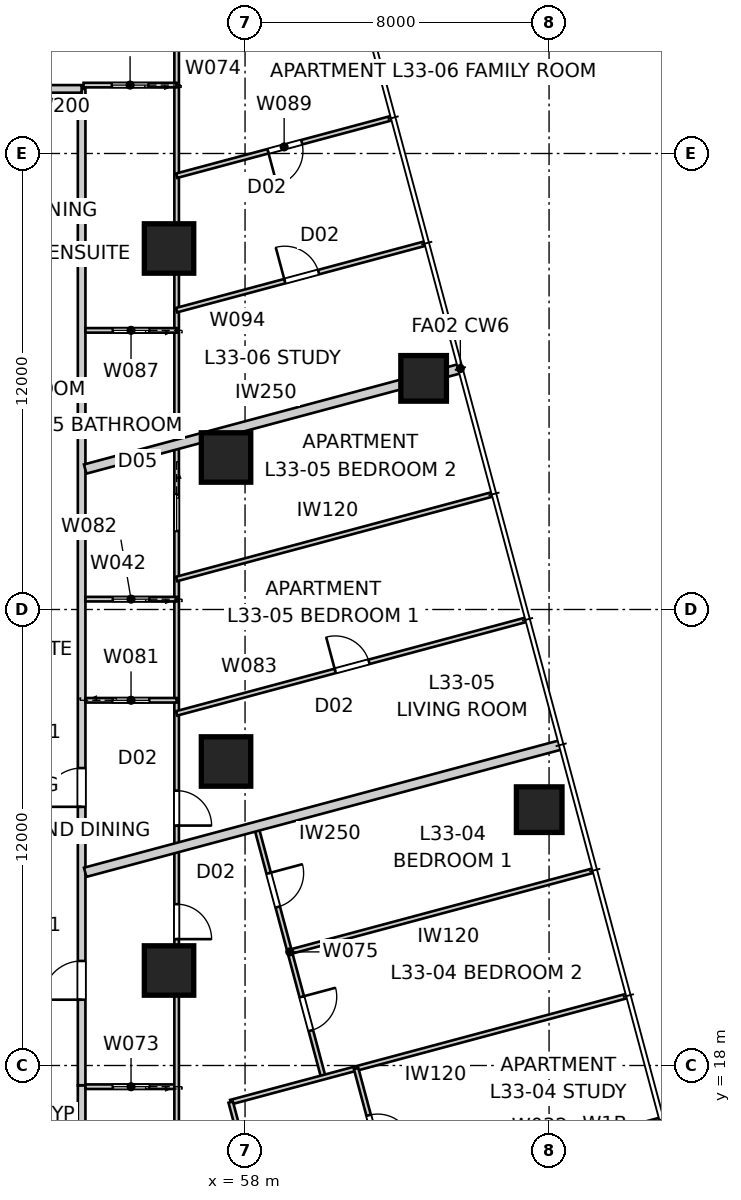
"""IFC4 building model, lengths in metres.
Left out: names, types, materials, properties, quantities, classifications, styles, units other than length and angle.
Written with IfcOpenShell. Run it as: python <this file> out.ifc"""

import sys

from ifc_helpers import new_model, si_unit, direction, frame, frame_2d, origin, origin_2d, place, context, subcontext, project, spatial, rectangle, extrude, element, fill, save


model = new_model("IFC4")
c1 = context("Model", 3, precision=1e-05, world=origin(), true_north=direction((0.0, 1.0)))
c2 = subcontext(c1, "Body", "Model", "MODEL_VIEW")
j1 = project(units=[si_unit("LENGTHUNIT", "METRE"), si_unit("PLANEANGLEUNIT", "RADIAN")], contexts=[c1])
p1 = place(None, origin())
s1 = spatial("IfcSite", under=j1, at=p1, CompositionType="ELEMENT")
p2 = place(p1, origin())
s2 = spatial("IfcBuilding", under=s1, at=p2, CompositionType="ELEMENT")
p3 = place(p2, frame((0.0, 0.0, 121.8)))
s3 = spatial("IfcBuildingStorey", under=s2, at=p3, CompositionType="ELEMENT", Elevation=121.8)
for number, where, z_axis, x_axis in (
    (1, (65.74, 24.733, 0.0), (0.0, 0.0, 1.0), (1.0, 0.0, 0.0)),
    (2, (62.699, 36.082, 0.0), (0.0, 0.0, 1.0), (1.0, 0.0, 0.0)),
):
    element("IfcColumn", number, at=place(p3, frame(where, z_axis=z_axis, x_axis=x_axis)), inside=s3, PredefinedType="COLUMN", context=c2, shape_type="SweptSolid", body=[
        extrude(rectangle(XDim=1.2, YDim=1.2, at=origin_2d()), origin(), (0.0, 0.0, 1.0), 3.4),
    ])
for number, where, z_axis, x_axis in (
    (3, (57.5, 26.0, 0.0), (0.0, 0.0, 1.0), (1.0, 0.0, 0.0)),
    (4, (57.5, 34.0, 0.0), (0.0, 0.0, 1.0), (1.0, 0.0, 0.0)),
    (5, (56.0, 39.5, 0.0), (0.0, 0.0, 1.0), (1.0, 0.0, 0.0)),
    (6, (56.0, 20.5, 0.0), (0.0, 0.0, 1.0), (1.0, 0.0, 0.0)),
):
    element("IfcColumn", number, at=place(p3, frame(where, z_axis=z_axis, x_axis=x_axis)), inside=s3, PredefinedType="COLUMN", context=c2, shape_type="SweptSolid", body=[
        extrude(rectangle(XDim=1.3, YDim=1.3, at=origin_2d()), origin(), (0.0, 0.0, 1.0), 3.4),
    ])
p4 = place(p3, frame((65.107, 15.504, 0.0), z_axis=(0.0, 0.0, 1.0), x_axis=(0.965934430412, 0.258786931944, 0.0)))
e7 = element("IfcWall", 7, at=p4, inside=s3, PredefinedType="SOLIDWALL", context=c2, shape_type="SweptSolid", body=[
    extrude(rectangle(XDim=4.0, YDim=0.2, at=frame_2d((2.0, 0.0))), origin(), (0.0, 0.0, 1.0), 3.25),
])
p5 = place(p4, frame((1.0, 0.0, 0.45)))
e8 = element("IfcOpeningElement", 8, at=p5, cuts=e7, PredefinedType="OPENING", context=c2, shape_type="SweptSolid", body=[
    extrude(rectangle(XDim=2.0, YDim=1.8, at=frame_2d((1.0, 0.9))), frame((0.0, 0.11, 0.0), z_axis=(0.0, -1.0, 0.0), x_axis=(1.0, 0.0, 0.0)), (0.0, 0.0, 1.0), 0.22),
])
p6 = place(p3, frame((53.7, 15.926, 0.0), z_axis=(0.0, 0.0, 1.0), x_axis=(0.0, 1.0, 0.0)))
e9 = element("IfcWall", 9, at=p6, inside=s3, PredefinedType="PARTITIONING", context=c2, shape_type="SweptSolid", body=[
    extrude(rectangle(XDim=1.554, YDim=0.2, at=frame_2d((0.777, 0.0))), origin(), (0.0, 0.0, 1.0), 2.722),
])
p7 = place(p3, frame((53.7, 17.48, 0.0), z_axis=(0.0, 0.0, 1.0), x_axis=(0.0, 1.0, 0.0)))
e10 = element("IfcWall", 10, at=p7, inside=s3, PredefinedType="PARTITIONING", context=c2, shape_type="SweptSolid", body=[
    extrude(rectangle(XDim=26.22, YDim=0.2, at=frame_2d((13.11, 0.0))), origin(), (0.0, 0.0, 1.0), 3.25),
])
p8 = place(p7, frame((2.252, 0.0, 0.0)))
e11 = element("IfcOpeningElement", 11, at=p8, cuts=e10, PredefinedType="OPENING", context=c2, shape_type="SweptSolid", body=[
    extrude(rectangle(XDim=1.02, YDim=2.34, at=frame_2d((0.51, 1.17))), frame((0.0, 0.11, 0.0), z_axis=(0.0, -1.0, 0.0), x_axis=(1.0, 0.0, 0.0)), (0.0, 0.0, 1.0), 0.22),
])
p9 = place(p7, frame((7.328, 0.0, 0.0)))
e12 = element("IfcOpeningElement", 12, at=p9, cuts=e10, PredefinedType="OPENING", context=c2, shape_type="SweptSolid", body=[
    extrude(rectangle(XDim=1.02, YDim=2.34, at=frame_2d((0.51, 1.17))), frame((0.0, 0.11, 0.0), z_axis=(0.0, -1.0, 0.0), x_axis=(1.0, 0.0, 0.0)), (0.0, 0.0, 1.0), 0.22),
])
p10 = place(p3, frame((53.7, 43.7, 0.0), z_axis=(0.0, 0.0, 1.0), x_axis=(-1.0, 0.0, 0.0)))
e13 = element("IfcWall", 13, at=p10, inside=s3, PredefinedType="PARTITIONING", context=c2, shape_type="SweptSolid", body=[
    extrude(rectangle(XDim=1.18, YDim=0.2, at=frame_2d((0.59, 0.0))), origin(), (0.0, 0.0, 1.0), 2.722),
])
p11 = place(p3, frame((63.665, 36.341, 0.0), z_axis=(0.0, 0.0, 1.0), x_axis=(-0.965927365002, -0.258813302479, 0.0)))
e14 = element("IfcWall", 14, at=p11, inside=s3, PredefinedType="PARTITIONING", context=c2, shape_type="SweptSolid", body=[
    extrude(rectangle(XDim=10.22, YDim=0.25, at=frame_2d((5.11, 0.0))), origin(), (0.0, 0.0, 1.0), 3.25),
])
p12 = place(p3, frame((66.318, 26.44, 0.0), z_axis=(0.0, 0.0, 1.0), x_axis=(-0.965924854576, -0.258822671559, 0.0)))
e15 = element("IfcWall", 15, at=p12, inside=s3, PredefinedType="PARTITIONING", context=c2, shape_type="SweptSolid", body=[
    extrude(rectangle(XDim=12.966, YDim=0.25, at=frame_2d((6.483, 0.0))), origin(), (0.0, 0.0, 1.0), 3.25),
])
p13 = place(p3, frame((56.2, 17.442, 0.0), z_axis=(0.0, 0.0, 1.0), x_axis=(-1.0, 0.0, 0.0)))
e16 = element("IfcWall", 16, at=p13, inside=s3, PredefinedType="PARTITIONING", context=c2, shape_type="SweptSolid", body=[
    extrude(rectangle(XDim=2.4, YDim=0.12, at=frame_2d((1.2, 0.0))), origin(), (0.0, 0.0, 1.0), 3.25),
])
p14 = place(p13, frame((0.72, 0.0, 0.0)))
e17 = element("IfcOpeningElement", 17, at=p14, cuts=e16, PredefinedType="OPENING", context=c2, shape_type="SweptSolid", body=[
    extrude(rectangle(XDim=0.96, YDim=2.1, at=frame_2d((0.48, 1.05))), frame((0.0, 0.07, 0.0), z_axis=(0.0, -1.0, 0.0), x_axis=(1.0, 0.0, 0.0)), (0.0, 0.0, 1.0), 0.14),
])
p15 = place(p3, frame((56.2, 46.2, 0.0), z_axis=(0.0, 0.0, 1.0), x_axis=(0.0, -1.0, 0.0)))
e18 = element("IfcWall", 18, at=p15, inside=s3, PredefinedType="PARTITIONING", context=c2, shape_type="SweptSolid", body=[
    extrude(rectangle(XDim=33.2, YDim=0.12, at=frame_2d((16.6, 0.0))), origin(), (0.0, 0.0, 1.0), 2.55),
])
p16 = place(p15, frame((23.955, 0.0, 0.0)))
e19 = element("IfcOpeningElement", 19, at=p16, cuts=e18, PredefinedType="OPENING", context=c2, shape_type="SweptSolid", body=[
    extrude(rectangle(XDim=0.92, YDim=2.34, at=frame_2d((0.46, 1.17))), frame((0.0, 0.07, 0.0), z_axis=(0.0, -1.0, 0.0), x_axis=(1.0, 0.0, 0.0)), (0.0, 0.0, 1.0), 0.14),
])
p17 = place(p15, frame((20.966, 0.0, 0.0)))
e20 = element("IfcOpeningElement", 20, at=p17, cuts=e18, PredefinedType="OPENING", context=c2, shape_type="SweptSolid", body=[
    extrude(rectangle(XDim=0.92, YDim=2.34, at=frame_2d((0.46, 1.17))), frame((0.0, 0.07, 0.0), z_axis=(0.0, -1.0, 0.0), x_axis=(1.0, 0.0, 0.0)), (0.0, 0.0, 1.0), 0.14),
])
p18 = place(p15, frame((13.174, 0.0, 0.0)))
e21 = element("IfcOpeningElement", 21, at=p18, cuts=e18, PredefinedType="OPENING", context=c2, shape_type="SweptSolid", body=[
    extrude(rectangle(XDim=0.96, YDim=2.1, at=frame_2d((0.48, 1.05))), frame((0.0, 0.07, 0.0), z_axis=(0.0, -1.0, 0.0), x_axis=(1.0, 0.0, 0.0)), (0.0, 0.0, 1.0), 0.14),
])
p19 = place(p3, frame((58.292, 24.29, 0.0), z_axis=(0.0, 0.0, 1.0), x_axis=(0.258809899302, -0.965928276853, 0.0)))
e22 = element("IfcWall", 22, at=p19, inside=s3, PredefinedType="PARTITIONING", context=c2, shape_type="SweptSolid", body=[
    extrude(rectangle(XDim=6.833, YDim=0.12, at=frame_2d((3.417, 0.0))), origin(), (0.0, 0.0, 1.0), 3.25),
])
p20 = place(p19, frame((1.273, 0.0, 0.0)))
e23 = element("IfcOpeningElement", 23, at=p20, cuts=e22, PredefinedType="OPENING", context=c2, shape_type="SweptSolid", body=[
    extrude(rectangle(XDim=0.92, YDim=2.34, at=frame_2d((0.46, 1.17))), frame((0.0, 0.07, 0.0), z_axis=(0.0, -1.0, 0.0), x_axis=(1.0, 0.0, 0.0)), (0.0, 0.0, 1.0), 0.14),
])
p21 = place(p19, frame((4.64, 0.0, 0.0)))
e24 = element("IfcOpeningElement", 24, at=p21, cuts=e22, PredefinedType="OPENING", context=c2, shape_type="SweptSolid", body=[
    extrude(rectangle(XDim=0.92, YDim=2.34, at=frame_2d((0.46, 1.17))), frame((0.0, 0.07, 0.0), z_axis=(0.0, -1.0, 0.0), x_axis=(1.0, 0.0, 0.0)), (0.0, 0.0, 1.0), 0.14),
])
p22 = place(p3, frame((68.048, 19.83, 0.0), z_axis=(0.0, 0.0, 1.0), x_axis=(-0.965921496576, -0.258835203272, 0.0)))
e25 = element("IfcWall", 25, at=p22, inside=s3, PredefinedType="PARTITIONING", context=c2, shape_type="SweptSolid", body=[
    extrude(rectangle(XDim=10.793, YDim=0.12, at=frame_2d((5.397, 0.0))), origin(), (0.0, 0.0, 1.0), 3.25),
])
p23 = place(p3, frame((57.623, 17.036, 0.0), z_axis=(0.0, 0.0, 1.0), x_axis=(0.258816044185, -0.965926630377, 0.0)))
e26 = element("IfcWall", 26, at=p23, inside=s3, PredefinedType="PARTITIONING", context=c2, shape_type="SweptSolid", body=[
    extrude(rectangle(XDim=7.377, YDim=0.12, at=frame_2d((3.688, 0.0))), origin(), (0.0, 0.0, 1.0), 2.638),
])
p24 = place(p23, frame((3.248, 0.0, 0.0)))
e27 = element("IfcOpeningElement", 27, at=p24, cuts=e26, PredefinedType="OPENING", context=c2, shape_type="SweptSolid", body=[
    extrude(rectangle(XDim=0.92, YDim=2.34, at=frame_2d((0.46, 1.17))), frame((0.0, 0.07, 0.0), z_axis=(0.0, -1.0, 0.0), x_axis=(1.0, 0.0, 0.0)), (0.0, 0.0, 1.0), 0.14),
])
p25 = place(p3, frame((67.164, 23.13, 0.0), z_axis=(0.0, 0.0, 1.0), x_axis=(-0.965929470378, -0.258805444794, 0.0)))
e28 = element("IfcWall", 28, at=p25, inside=s3, PredefinedType="PARTITIONING", context=c2, shape_type="SweptSolid", body=[
    extrude(rectangle(XDim=8.269, YDim=0.12, at=frame_2d((4.135, 0.0))), origin(), (0.0, 0.0, 1.0), 2.722),
])
p26 = place(p3, frame((60.923, 17.92, 0.0), z_axis=(0.0, 0.0, 1.0), x_axis=(0.258846923464, -0.965918355874, 0.0)))
e29 = element("IfcWall", 29, at=p26, inside=s3, PredefinedType="PARTITIONING", context=c2, shape_type="SweptSolid", body=[
    extrude(rectangle(XDim=7.377, YDim=0.12, at=frame_2d((3.688, 0.0))), origin(), (0.0, 0.0, 1.0), 3.25),
])
p27 = place(p26, frame((4.932, 0.0, 0.0)))
e30 = element("IfcOpeningElement", 30, at=p27, cuts=e29, PredefinedType="OPENING", context=c2, shape_type="SweptSolid", body=[
    extrude(rectangle(XDim=0.92, YDim=2.34, at=frame_2d((0.46, 1.17))), frame((0.0, 0.07, 0.0), z_axis=(0.0, -1.0, 0.0), x_axis=(1.0, 0.0, 0.0)), (0.0, 0.0, 1.0), 0.14),
])
p28 = place(p26, frame((1.273, 0.0, 0.0)))
e31 = element("IfcOpeningElement", 31, at=p28, cuts=e29, PredefinedType="OPENING", context=c2, shape_type="SweptSolid", body=[
    extrude(rectangle(XDim=0.92, YDim=2.34, at=frame_2d((0.46, 1.17))), frame((0.0, 0.07, 0.0), z_axis=(0.0, -1.0, 0.0), x_axis=(1.0, 0.0, 0.0)), (0.0, 0.0, 1.0), 0.14),
])
p29 = place(p3, frame((53.8, 27.611, 0.0), z_axis=(0.0, 0.0, 1.0), x_axis=(1.0, 0.0, 0.0)))
e32 = element("IfcWall", 32, at=p29, inside=s3, PredefinedType="PARTITIONING", context=c2, shape_type="SweptSolid", body=[
    extrude(rectangle(XDim=2.4, YDim=0.12, at=frame_2d((1.2, 0.0))), origin(), (0.0, 0.0, 1.0), 3.25),
])
p30 = place(p29, frame((0.72, 0.0, 0.0)))
e33 = element("IfcOpeningElement", 33, at=p30, cuts=e32, PredefinedType="OPENING", context=c2, shape_type="SweptSolid", body=[
    extrude(rectangle(XDim=0.96, YDim=2.1, at=frame_2d((0.48, 1.05))), frame((0.0, 0.07, 0.0), z_axis=(0.0, -1.0, 0.0), x_axis=(1.0, 0.0, 0.0)), (0.0, 0.0, 1.0), 0.14),
])
p31 = place(p3, frame((56.2, 30.272, 0.0), z_axis=(0.0, 0.0, 1.0), x_axis=(-1.0, 0.0, 0.0)))
e34 = element("IfcWall", 34, at=p31, inside=s3, PredefinedType="PARTITIONING", context=c2, shape_type="SweptSolid", body=[
    extrude(rectangle(XDim=2.4, YDim=0.12, at=frame_2d((1.2, 0.0))), origin(), (0.0, 0.0, 1.0), 3.25),
])
p32 = place(p31, frame((0.72, 0.0, 0.0)))
e35 = element("IfcOpeningElement", 35, at=p32, cuts=e34, PredefinedType="OPENING", context=c2, shape_type="SweptSolid", body=[
    extrude(rectangle(XDim=0.96, YDim=2.1, at=frame_2d((0.48, 1.05))), frame((0.0, 0.07, 0.0), z_axis=(0.0, -1.0, 0.0), x_axis=(1.0, 0.0, 0.0)), (0.0, 0.0, 1.0), 0.14),
])
p33 = place(p3, frame((56.2, 27.266, 0.0), z_axis=(0.0, 0.0, 1.0), x_axis=(0.965926072385, 0.25881812666, 0.0)))
e36 = element("IfcWall", 36, at=p33, inside=s3, PredefinedType="PARTITIONING", context=c2, shape_type="SweptSolid", body=[
    extrude(rectangle(XDim=9.52, YDim=0.12, at=frame_2d((4.76, 0.0))), origin(), (0.0, 0.0, 1.0), 3.25),
])
p34 = place(p33, frame((4.32, 0.0, 0.0)))
e37 = element("IfcOpeningElement", 37, at=p34, cuts=e36, PredefinedType="OPENING", context=c2, shape_type="SweptSolid", body=[
    extrude(rectangle(XDim=0.92, YDim=2.34, at=frame_2d((0.46, 1.17))), frame((0.0, 0.07, 0.0), z_axis=(0.0, -1.0, 0.0), x_axis=(1.0, 0.0, 0.0)), (0.0, 0.0, 1.0), 0.14),
])
p35 = place(p3, frame((56.2, 30.803, 0.0), z_axis=(0.0, 0.0, 1.0), x_axis=(0.965920565748, 0.258838676912, 0.0)))
e38 = element("IfcWall", 38, at=p35, inside=s3, PredefinedType="PARTITIONING", context=c2, shape_type="SweptSolid", body=[
    extrude(rectangle(XDim=8.604, YDim=0.12, at=frame_2d((4.302, 0.0))), origin(), (0.0, 0.0, 1.0), 3.25),
])
p36 = place(p3, frame((56.2, 43.8, 0.0), z_axis=(0.0, 0.0, 1.0), x_axis=(-1.0, 0.0, 0.0)))
e39 = element("IfcWall", 39, at=p36, inside=s3, PredefinedType="PARTITIONING", context=c2, shape_type="SweptSolid", body=[
    extrude(rectangle(XDim=2.45, YDim=0.12, at=frame_2d((1.225, 0.0))), origin(), (0.0, 0.0, 1.0), 2.722),
])
p37 = place(p36, frame((0.745, 0.0, 0.0)))
e40 = element("IfcOpeningElement", 40, at=p37, cuts=e39, PredefinedType="OPENING", context=c2, shape_type="SweptSolid", body=[
    extrude(rectangle(XDim=0.96, YDim=2.1, at=frame_2d((0.48, 1.05))), frame((0.0, 0.07, 0.0), z_axis=(0.0, -1.0, 0.0), x_axis=(1.0, 0.0, 0.0)), (0.0, 0.0, 1.0), 0.14),
])
p38 = place(p3, frame((56.2, 37.345, 0.0), z_axis=(0.0, 0.0, 1.0), x_axis=(-1.0, 0.0, 0.0)))
e41 = element("IfcWall", 41, at=p38, inside=s3, PredefinedType="PARTITIONING", context=c2, shape_type="SweptSolid", body=[
    extrude(rectangle(XDim=2.4, YDim=0.12, at=frame_2d((1.2, 0.0))), origin(), (0.0, 0.0, 1.0), 3.25),
])
p39 = place(p38, frame((0.72, 0.0, 0.0)))
e42 = element("IfcOpeningElement", 42, at=p39, cuts=e41, PredefinedType="OPENING", context=c2, shape_type="SweptSolid", body=[
    extrude(rectangle(XDim=0.96, YDim=2.1, at=frame_2d((0.48, 1.05))), frame((0.0, 0.07, 0.0), z_axis=(0.0, -1.0, 0.0), x_axis=(1.0, 0.0, 0.0)), (0.0, 0.0, 1.0), 0.14),
])
p40 = place(p3, frame((61.858, 42.931, 0.0), z_axis=(0.0, 0.0, 1.0), x_axis=(-0.965933354686, -0.258790947109, 0.0)))
e43 = element("IfcWall", 43, at=p40, inside=s3, PredefinedType="PARTITIONING", context=c2, shape_type="SweptSolid", body=[
    extrude(rectangle(XDim=5.857, YDim=0.12, at=frame_2d((2.929, 0.0))), origin(), (0.0, 0.0, 1.0), 3.25),
])
p41 = place(p40, frame((2.449, 0.0, 0.0)))
e44 = element("IfcOpeningElement", 44, at=p41, cuts=e43, PredefinedType="OPENING", context=c2, shape_type="SweptSolid", body=[
    extrude(rectangle(XDim=0.92, YDim=2.34, at=frame_2d((0.46, 1.17))), frame((0.0, 0.07, 0.0), z_axis=(0.0, -1.0, 0.0), x_axis=(1.0, 0.0, 0.0)), (0.0, 0.0, 1.0), 0.14),
])
p42 = place(p3, frame((56.2, 37.878, 0.0), z_axis=(0.0, 0.0, 1.0), x_axis=(0.96591892777, 0.258844789354, 0.0)))
e45 = element("IfcWall", 45, at=p42, inside=s3, PredefinedType="PARTITIONING", context=c2, shape_type="SweptSolid", body=[
    extrude(rectangle(XDim=6.773, YDim=0.12, at=frame_2d((3.386, 0.0))), origin(), (0.0, 0.0, 1.0), 3.25),
])
p43 = place(p42, frame((2.947, 0.0, 0.0)))
e46 = element("IfcOpeningElement", 46, at=p43, cuts=e45, PredefinedType="OPENING", context=c2, shape_type="SweptSolid", body=[
    extrude(rectangle(XDim=0.92, YDim=2.34, at=frame_2d((0.46, 1.17))), frame((0.0, 0.07, 0.0), z_axis=(0.0, -1.0, 0.0), x_axis=(1.0, 0.0, 0.0)), (0.0, 0.0, 1.0), 0.14),
])
p44 = place(p8, origin())
e47 = element("IfcDoor", 47, at=p44, inside=s3, OperationType="SINGLE_SWING_LEFT", PredefinedType="DOOR", context=c2, shape_type="SweptSolid", body=[
    extrude(rectangle(XDim=1.02, YDim=2.34, at=frame_2d((0.51, 1.17))), frame((0.0, 0.025, 0.0), z_axis=(0.0, -1.0, 0.0), x_axis=(1.0, 0.0, 0.0)), (0.0, 0.0, 1.0), 0.05),
])
fill(e11, e47)
p45 = place(p9, origin())
e48 = element("IfcDoor", 48, at=p45, inside=s3, OperationType="SINGLE_SWING_LEFT", PredefinedType="DOOR", context=c2, shape_type="SweptSolid", body=[
    extrude(rectangle(XDim=1.02, YDim=2.34, at=frame_2d((0.51, 1.17))), frame((0.0, 0.025, 0.0), z_axis=(0.0, -1.0, 0.0), x_axis=(1.0, 0.0, 0.0)), (0.0, 0.0, 1.0), 0.05),
])
fill(e12, e48)
p46 = place(p37, origin())
e49 = element("IfcDoor", 49, at=p46, inside=s3, OperationType="SLIDING_TO_LEFT", PredefinedType="DOOR", context=c2, shape_type="SweptSolid", body=[
    extrude(rectangle(XDim=0.96, YDim=2.1, at=frame_2d((0.48, 1.05))), frame((0.0, 0.025, 0.0), z_axis=(0.0, -1.0, 0.0), x_axis=(1.0, 0.0, 0.0)), (0.0, 0.0, 1.0), 0.05),
])
fill(e40, e49)
p47 = place(p16, origin())
e50 = element("IfcDoor", 50, at=p47, inside=s3, OperationType="SINGLE_SWING_RIGHT", PredefinedType="DOOR", context=c2, shape_type="SweptSolid", body=[
    extrude(rectangle(XDim=0.92, YDim=2.34, at=frame_2d((0.46, 1.17))), frame((0.0, 0.025, 0.0), z_axis=(0.0, -1.0, 0.0), x_axis=(1.0, 0.0, 0.0)), (0.0, 0.0, 1.0), 0.05),
])
fill(e19, e50)
p48 = place(p14, origin())
e51 = element("IfcDoor", 51, at=p48, inside=s3, OperationType="SLIDING_TO_LEFT", PredefinedType="DOOR", context=c2, shape_type="SweptSolid", body=[
    extrude(rectangle(XDim=0.96, YDim=2.1, at=frame_2d((0.48, 1.05))), frame((0.0, 0.025, 0.0), z_axis=(0.0, -1.0, 0.0), x_axis=(1.0, 0.0, 0.0)), (0.0, 0.0, 1.0), 0.05),
])
fill(e17, e51)
p49 = place(p17, origin())
e52 = element("IfcDoor", 52, at=p49, inside=s3, OperationType="SINGLE_SWING_RIGHT", PredefinedType="DOOR", context=c2, shape_type="SweptSolid", body=[
    extrude(rectangle(XDim=0.92, YDim=2.34, at=frame_2d((0.46, 1.17))), frame((0.0, 0.025, 0.0), z_axis=(0.0, -1.0, 0.0), x_axis=(1.0, 0.0, 0.0)), (0.0, 0.0, 1.0), 0.05),
])
fill(e20, e52)
p50 = place(p30, origin())
e53 = element("IfcDoor", 53, at=p50, inside=s3, OperationType="SLIDING_TO_LEFT", PredefinedType="DOOR", context=c2, shape_type="SweptSolid", body=[
    extrude(rectangle(XDim=0.96, YDim=2.1, at=frame_2d((0.48, 1.05))), frame((0.0, 0.025, 0.0), z_axis=(0.0, -1.0, 0.0), x_axis=(1.0, 0.0, 0.0)), (0.0, 0.0, 1.0), 0.05),
])
fill(e33, e53)
p51 = place(p41, origin())
e54 = element("IfcDoor", 54, at=p51, inside=s3, OperationType="SINGLE_SWING_RIGHT", PredefinedType="DOOR", context=c2, shape_type="SweptSolid", body=[
    extrude(rectangle(XDim=0.92, YDim=2.34, at=frame_2d((0.46, 1.17))), frame((0.0, 0.025, 0.0), z_axis=(0.0, -1.0, 0.0), x_axis=(1.0, 0.0, 0.0)), (0.0, 0.0, 1.0), 0.05),
])
fill(e44, e54)
p52 = place(p39, origin())
e55 = element("IfcDoor", 55, at=p52, inside=s3, OperationType="SLIDING_TO_LEFT", PredefinedType="DOOR", context=c2, shape_type="SweptSolid", body=[
    extrude(rectangle(XDim=0.96, YDim=2.1, at=frame_2d((0.48, 1.05))), frame((0.0, 0.025, 0.0), z_axis=(0.0, -1.0, 0.0), x_axis=(1.0, 0.0, 0.0)), (0.0, 0.0, 1.0), 0.05),
])
fill(e42, e55)
p53 = place(p20, origin())
e56 = element("IfcDoor", 56, at=p53, inside=s3, OperationType="SINGLE_SWING_LEFT", PredefinedType="DOOR", context=c2, shape_type="SweptSolid", body=[
    extrude(rectangle(XDim=0.92, YDim=2.34, at=frame_2d((0.46, 1.17))), frame((0.0, 0.025, 0.0), z_axis=(0.0, -1.0, 0.0), x_axis=(1.0, 0.0, 0.0)), (0.0, 0.0, 1.0), 0.05),
])
fill(e23, e56)
p54 = place(p21, origin())
e57 = element("IfcDoor", 57, at=p54, inside=s3, OperationType="SINGLE_SWING_LEFT", PredefinedType="DOOR", context=c2, shape_type="SweptSolid", body=[
    extrude(rectangle(XDim=0.92, YDim=2.34, at=frame_2d((0.46, 1.17))), frame((0.0, 0.025, 0.0), z_axis=(0.0, -1.0, 0.0), x_axis=(1.0, 0.0, 0.0)), (0.0, 0.0, 1.0), 0.05),
])
fill(e24, e57)
p55 = place(p34, origin())
e58 = element("IfcDoor", 58, at=p55, inside=s3, OperationType="SINGLE_SWING_LEFT", PredefinedType="DOOR", context=c2, shape_type="SweptSolid", body=[
    extrude(rectangle(XDim=0.92, YDim=2.34, at=frame_2d((0.46, 1.17))), frame((0.0, 0.025, 0.0), z_axis=(0.0, -1.0, 0.0), x_axis=(1.0, 0.0, 0.0)), (0.0, 0.0, 1.0), 0.05),
])
fill(e37, e58)
p56 = place(p32, origin())
e59 = element("IfcDoor", 59, at=p56, inside=s3, OperationType="SLIDING_TO_LEFT", PredefinedType="DOOR", context=c2, shape_type="SweptSolid", body=[
    extrude(rectangle(XDim=0.96, YDim=2.1, at=frame_2d((0.48, 1.05))), frame((0.0, 0.025, 0.0), z_axis=(0.0, -1.0, 0.0), x_axis=(1.0, 0.0, 0.0)), (0.0, 0.0, 1.0), 0.05),
])
fill(e35, e59)
p57 = place(p43, origin())
e60 = element("IfcDoor", 60, at=p57, inside=s3, OperationType="SINGLE_SWING_LEFT", PredefinedType="DOOR", context=c2, shape_type="SweptSolid", body=[
    extrude(rectangle(XDim=0.92, YDim=2.34, at=frame_2d((0.46, 1.17))), frame((0.0, 0.025, 0.0), z_axis=(0.0, -1.0, 0.0), x_axis=(1.0, 0.0, 0.0)), (0.0, 0.0, 1.0), 0.05),
])
fill(e46, e60)
p58 = place(p18, origin())
e61 = element("IfcDoor", 61, at=p58, inside=s3, OperationType="SLIDING_TO_LEFT", PredefinedType="DOOR", context=c2, shape_type="SweptSolid", body=[
    extrude(rectangle(XDim=0.96, YDim=2.1, at=frame_2d((0.48, 1.05))), frame((0.0, 0.025, 0.0), z_axis=(0.0, -1.0, 0.0), x_axis=(1.0, 0.0, 0.0)), (0.0, 0.0, 1.0), 0.05),
])
fill(e21, e61)
p59 = place(p28, origin())
e62 = element("IfcDoor", 62, at=p59, inside=s3, OperationType="SINGLE_SWING_RIGHT", PredefinedType="DOOR", context=c2, shape_type="SweptSolid", body=[
    extrude(rectangle(XDim=0.92, YDim=2.34, at=frame_2d((0.46, 1.17))), frame((0.0, 0.025, 0.0), z_axis=(0.0, -1.0, 0.0), x_axis=(1.0, 0.0, 0.0)), (0.0, 0.0, 1.0), 0.05),
])
fill(e31, e62)
save(model, sys.argv[1])
